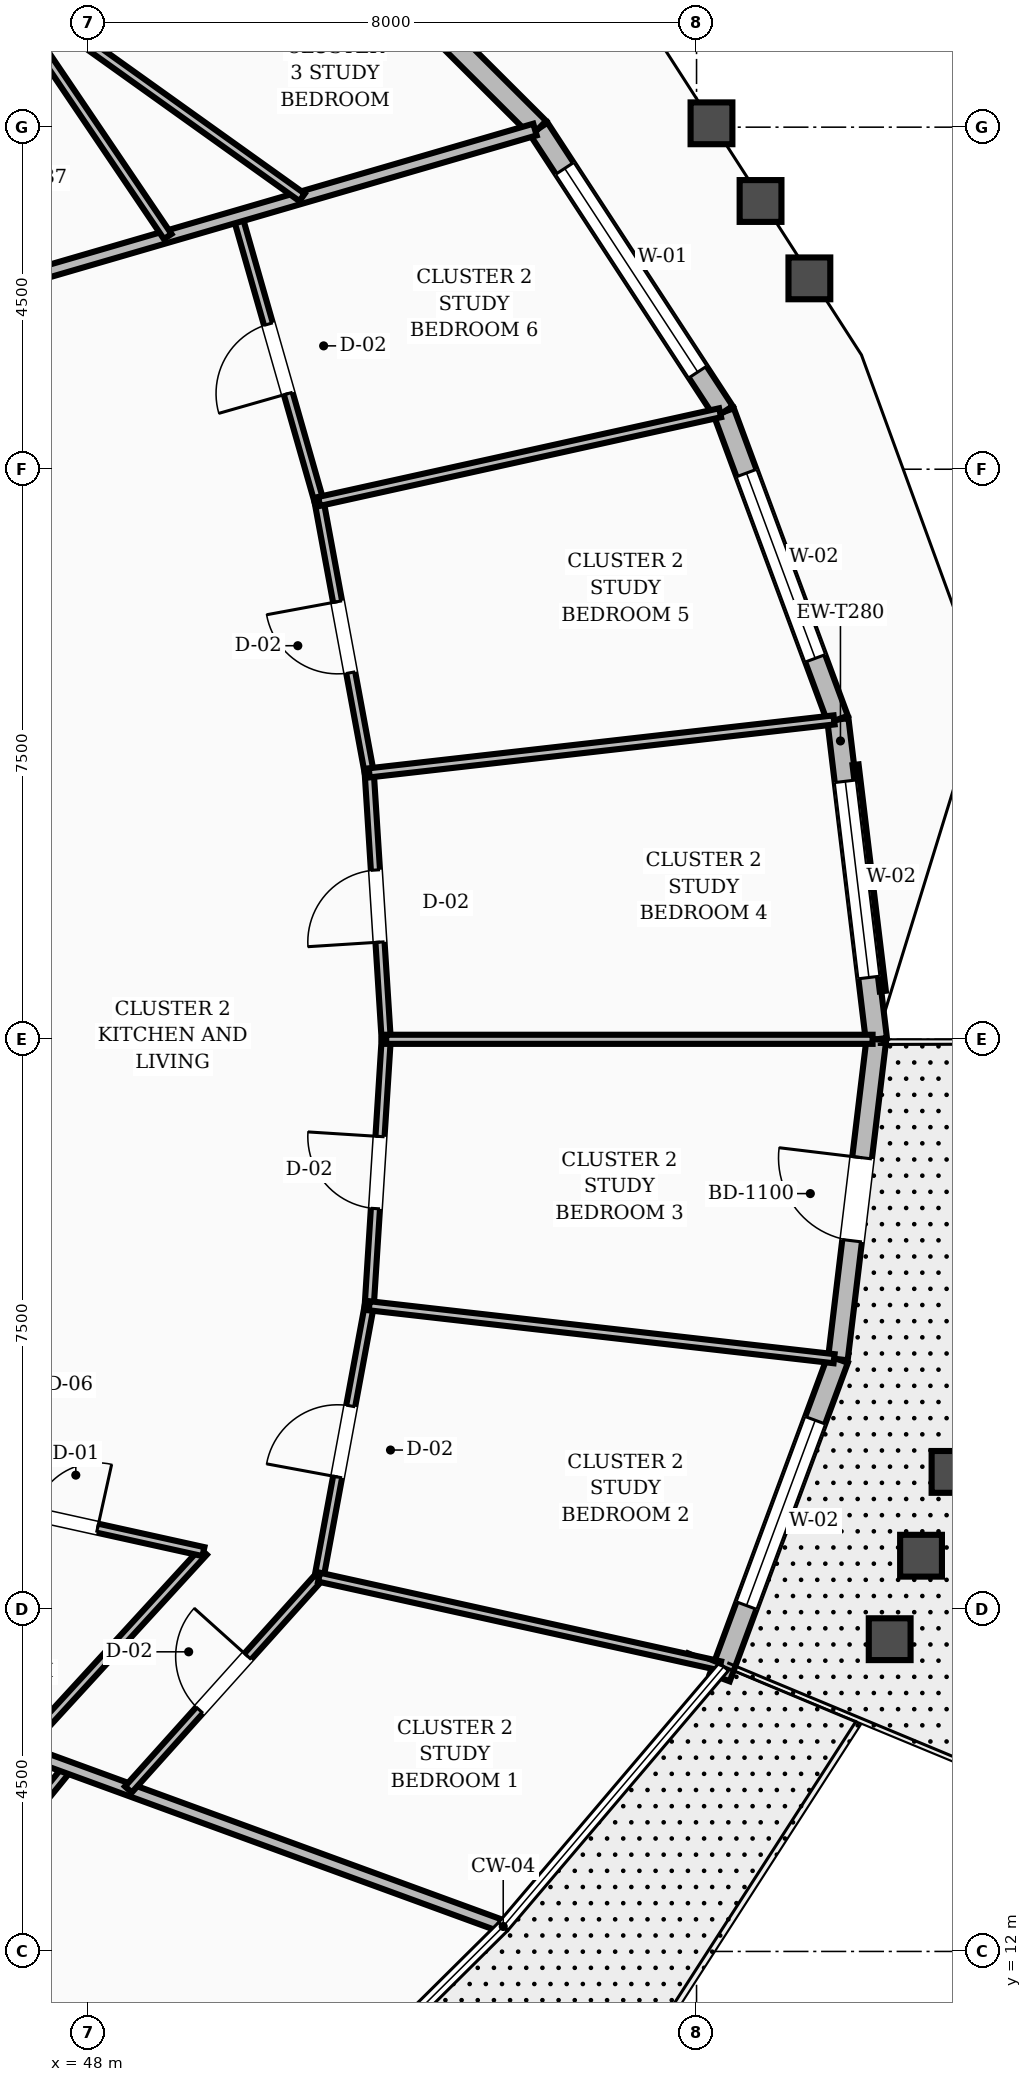
"""IFC4 building model, lengths in metres.
Left out: names, types, materials, properties, quantities, classifications, styles, units other than length and angle.
Written with IfcOpenShell. Run it as: python <this file> out.ifc"""

import sys

from ifc_helpers import new_model, si_unit, direction, frame, frame_2d, origin, place, context, subcontext, project, spatial, rectangle, extrude, element, fill, save


model = new_model("IFC4")
c1 = context("Model", 3, precision=1e-05, world=origin(), true_north=direction((0.0, 1.0)))
c2 = subcontext(c1, "Body", "Model", "MODEL_VIEW")
j1 = project(units=[si_unit("LENGTHUNIT", "METRE"), si_unit("PLANEANGLEUNIT", "RADIAN")], contexts=[c1])
p1 = place(None, origin())
s1 = spatial("IfcSite", under=j1, at=p1, CompositionType="ELEMENT")
p2 = place(p1, origin())
s2 = spatial("IfcBuilding", under=s1, at=p2, CompositionType="ELEMENT")
p3 = place(p2, frame((0.0, 0.0, 149.6)))
s3 = spatial("IfcBuildingStorey", under=s2, at=p3, CompositionType="ELEMENT", Elevation=149.6)
p4 = place(p3, frame((58.366, 24.0, 0.0), z_axis=(0.0, 0.0, 1.0), x_axis=(-0.119531368207, 0.992830424602, 0.0)))
e1 = element("IfcWall", 1, at=p4, inside=s3, PredefinedType="STANDARD", context=c2, shape_type="SweptSolid", body=[
    extrude(rectangle(XDim=4.238, YDim=0.28, at=frame_2d((2.119, 0.0))), origin(), (0.0, 0.0, 1.0), 2.82),
])
p5 = place(p4, frame((0.819, 0.0, 0.8)))
e2 = element("IfcOpeningElement", 2, at=p5, cuts=e1, PredefinedType="OPENING", context=c2, shape_type="SweptSolid", body=[
    extrude(rectangle(XDim=2.6, YDim=1.65, at=frame_2d((1.3, 0.825))), frame((0.0, 0.15, 0.0), z_axis=(0.0, -1.0, 0.0), x_axis=(1.0, 0.0, 0.0)), (0.0, 0.0, 1.0), 0.3),
])
p6 = place(p3, frame((57.859, 28.208, 0.0), z_axis=(0.0, 0.0, 1.0), x_axis=(-0.347673660549, 0.937615606611, 0.0)))
e3 = element("IfcWall", 3, at=p6, inside=s3, PredefinedType="STANDARD", context=c2, shape_type="SweptSolid", body=[
    extrude(rectangle(XDim=4.315, YDim=0.28, at=frame_2d((2.158, 0.0))), origin(), (0.0, 0.0, 1.0), 2.82),
])
p7 = place(p6, frame((0.858, 0.0, 0.8)))
e4 = element("IfcOpeningElement", 4, at=p7, cuts=e3, PredefinedType="OPENING", context=c2, shape_type="SweptSolid", body=[
    extrude(rectangle(XDim=2.6, YDim=1.65, at=frame_2d((1.3, 0.825))), frame((0.0, 0.15, 0.0), z_axis=(0.0, -1.0, 0.0), x_axis=(1.0, 0.0, 0.0)), (0.0, 0.0, 1.0), 0.3),
])
p8 = place(p3, frame((56.359, 32.254, 0.0), z_axis=(0.0, 0.0, 1.0), x_axis=(-0.547011581396, 0.837125038342, 0.0)))
e5 = element("IfcWall", 5, at=p8, inside=s3, PredefinedType="STANDARD", context=c2, shape_type="SweptSolid", body=[
    extrude(rectangle(XDim=4.454, YDim=0.28, at=frame_2d((2.227, 0.0))), origin(), (0.0, 0.0, 1.0), 2.82),
])
p9 = place(p8, frame((0.627, 0.0, 0.8)))
e6 = element("IfcOpeningElement", 6, at=p9, cuts=e5, PredefinedType="OPENING", context=c2, shape_type="SweptSolid", body=[
    extrude(rectangle(XDim=3.2, YDim=1.65, at=frame_2d((1.6, 0.825))), frame((0.0, 0.15, 0.0), z_axis=(0.0, -1.0, 0.0), x_axis=(1.0, 0.0, 0.0)), (0.0, 0.0, 1.0), 0.3),
])
p10 = place(p3, frame((53.922, 35.982, 0.0), z_axis=(0.0, 0.0, 1.0), x_axis=(-0.708239604084, 0.705972140532, 0.0)))
e7 = element("IfcWall", 7, at=p10, inside=s3, PredefinedType="STANDARD", context=c2, shape_type="SweptSolid", body=[
    extrude(rectangle(XDim=4.63, YDim=0.28, at=frame_2d((2.315, 0.0))), origin(), (0.0, 0.0, 1.0), 2.82),
])
p11 = place(p3, frame((56.305, 15.602, 0.0), z_axis=(0.0, 0.0, 1.0), x_axis=(0.347666626945, 0.937618214685, 0.0)))
e8 = element("IfcWall", 8, at=p11, inside=s3, PredefinedType="STANDARD", context=c2, shape_type="SweptSolid", body=[
    extrude(rectangle(XDim=4.469, YDim=0.28, at=frame_2d((2.234, 0.0))), origin(), (0.0, 0.0, 1.0), 2.82),
])
p12 = place(p11, frame((1.011, 0.0, 0.8)))
e9 = element("IfcOpeningElement", 9, at=p12, cuts=e8, PredefinedType="OPENING", context=c2, shape_type="SweptSolid", body=[
    extrude(rectangle(XDim=2.6, YDim=1.65, at=frame_2d((1.3, 0.825))), frame((0.0, 0.15, 0.0), z_axis=(0.0, -1.0, 0.0), x_axis=(1.0, 0.0, 0.0)), (0.0, 0.0, 1.0), 0.3),
])
p13 = place(p3, frame((57.859, 19.792, 0.0), z_axis=(0.0, 0.0, 1.0), x_axis=(0.119531368207, 0.992830424602, 0.0)))
e10 = element("IfcWall", 10, at=p13, inside=s3, PredefinedType="STANDARD", context=c2, shape_type="SweptSolid", body=[
    extrude(rectangle(XDim=4.238, YDim=0.26, at=frame_2d((2.119, 0.0))), origin(), (0.0, 0.0, 1.0), 2.82),
])
p14 = place(p13, frame((1.569, 0.0, 0.0)))
e11 = element("IfcOpeningElement", 11, at=p14, cuts=e10, PredefinedType="OPENING", context=c2, shape_type="SweptSolid", body=[
    extrude(rectangle(XDim=1.1, YDim=2.15, at=frame_2d((0.55, 1.075))), frame((0.0, 0.14, 0.0), z_axis=(0.0, -1.0, 0.0), x_axis=(1.0, 0.0, 0.0)), (0.0, 0.0, 1.0), 0.28),
])
p15 = place(p3, frame((45.504, 11.683, 0.0), z_axis=(0.0, 0.0, 1.0), x_axis=(0.631277203428, 0.775557278628, 0.0)))
e12 = element("IfcWall", 12, at=p15, inside=s3, PredefinedType="PARTITIONING", context=c2, shape_type="SweptSolid", body=[
    extrude(rectangle(XDim=3.53, YDim=0.12, at=frame_2d((1.765, 0.0))), origin(), (0.0, 0.0, 1.0), 2.8),
])
p16 = place(p3, frame((44.65, 15.548, 0.0), z_axis=(0.0, 0.0, 1.0), x_axis=(0.939222726392, -0.343308418524, 0.0)))
e13 = element("IfcWall", 13, at=p16, inside=s3, PredefinedType="SOLIDWALL", context=c2, shape_type="SweptSolid", body=[
    extrude(rectangle(XDim=9.327, YDim=0.16, at=frame_2d((4.663, 0.0))), origin(), (0.0, 0.0, 1.0), 2.8),
])
p17 = place(p3, frame((47.116, 14.646, 0.0), z_axis=(0.0, 0.0, 1.0), x_axis=(0.675771389029, 0.737111273669, 0.0)))
e14 = element("IfcWall", 14, at=p17, inside=s3, PredefinedType="PARTITIONING", context=c2, shape_type="SweptSolid", body=[
    extrude(rectangle(XDim=3.546, YDim=0.12, at=frame_2d((1.773, 0.0))), origin(), (0.0, 0.0, 1.0), 2.8),
])
p18 = place(p3, frame((46.85, 17.849, 0.0), z_axis=(0.0, 0.0, 1.0), x_axis=(0.976420347176, -0.215877987808, 0.0)))
e15 = element("IfcWall", 15, at=p18, inside=s3, PredefinedType="PARTITIONING", context=c2, shape_type="SweptSolid", body=[
    extrude(rectangle(XDim=2.727, YDim=0.12, at=frame_2d((1.363, 0.0))), origin(), (0.0, 0.0, 1.0), 2.8),
])
p19 = place(p18, frame((0.44, 0.0, 0.0)))
e16 = element("IfcOpeningElement", 16, at=p19, cuts=e15, PredefinedType="OPENING", context=c2, shape_type="SweptSolid", body=[
    extrude(rectangle(XDim=0.86, YDim=2.1, at=frame_2d((0.43, 1.05))), frame((0.0, 0.07, 0.0), z_axis=(0.0, -1.0, 0.0), x_axis=(1.0, 0.0, 0.0)), (0.0, 0.0, 1.0), 0.14),
])
p20 = place(p3, frame((48.525, 14.131, 0.0), z_axis=(0.0, 0.0, 1.0), x_axis=(0.668314174757, 0.743879132533, 0.0)))
e17 = element("IfcWall", 17, at=p20, inside=s3, PredefinedType="PARTITIONING", context=c2, shape_type="SweptSolid", body=[
    extrude(rectangle(XDim=3.754, YDim=0.12, at=frame_2d((1.877, 0.0))), origin(), (0.0, 0.0, 1.0), 2.8),
])
p21 = place(p20, frame((1.402, 0.0, 0.0)))
e18 = element("IfcOpeningElement", 18, at=p21, cuts=e17, PredefinedType="OPENING", context=c2, shape_type="SweptSolid", body=[
    extrude(rectangle(XDim=0.95, YDim=2.1, at=frame_2d((0.475, 1.05))), frame((0.0, 0.07, 0.0), z_axis=(0.0, -1.0, 0.0), x_axis=(1.0, 0.0, 0.0)), (0.0, 0.0, 1.0), 0.14),
])
p22 = place(p3, frame((51.034, 16.924, 0.0), z_axis=(0.0, 0.0, 1.0), x_axis=(0.181807554869, 0.9833341309, 0.0)))
e19 = element("IfcWall", 19, at=p22, inside=s3, PredefinedType="PARTITIONING", context=c2, shape_type="SweptSolid", body=[
    extrude(rectangle(XDim=3.631, YDim=0.12, at=frame_2d((1.815, 0.0))), origin(), (0.0, 0.0, 1.0), 2.8),
])
p23 = place(p22, frame((1.341, 0.0, 0.0)))
e20 = element("IfcOpeningElement", 20, at=p23, cuts=e19, PredefinedType="OPENING", context=c2, shape_type="SweptSolid", body=[
    extrude(rectangle(XDim=0.95, YDim=2.1, at=frame_2d((0.475, 1.05))), frame((0.0, 0.07, 0.0), z_axis=(0.0, -1.0, 0.0), x_axis=(1.0, 0.0, 0.0)), (0.0, 0.0, 1.0), 0.14),
])
p24 = place(p3, frame((51.034, 16.924, 0.0), z_axis=(0.0, 0.0, 1.0), x_axis=(0.976410849666, -0.21592094075, 0.0)))
e21 = element("IfcWall", 21, at=p24, inside=s3, PredefinedType="PARTITIONING", context=c2, shape_type="SweptSolid", body=[
    extrude(rectangle(XDim=5.404, YDim=0.12, at=frame_2d((2.702, 0.0))), origin(), (0.0, 0.0, 1.0), 2.8),
])
p25 = place(p3, frame((51.694, 20.494, 0.0), z_axis=(0.0, 0.0, 1.0), x_axis=(0.063455671899, 0.99798465805, 0.0)))
e22 = element("IfcWall", 22, at=p25, inside=s3, PredefinedType="PARTITIONING", context=c2, shape_type="SweptSolid", body=[
    extrude(rectangle(XDim=3.513, YDim=0.12, at=frame_2d((1.756, 0.0))), origin(), (0.0, 0.0, 1.0), 2.8),
])
p26 = place(p25, frame((1.281, 0.0, 0.0)))
e23 = element("IfcOpeningElement", 23, at=p26, cuts=e22, PredefinedType="OPENING", context=c2, shape_type="SweptSolid", body=[
    extrude(rectangle(XDim=0.95, YDim=2.1, at=frame_2d((0.475, 1.05))), frame((0.0, 0.07, 0.0), z_axis=(0.0, -1.0, 0.0), x_axis=(1.0, 0.0, 0.0)), (0.0, 0.0, 1.0), 0.14),
])
p27 = place(p3, frame((51.694, 20.494, 0.0), z_axis=(0.0, 0.0, 1.0), x_axis=(0.993580655241, -0.113125954279, 0.0)))
e24 = element("IfcWall", 24, at=p27, inside=s3, PredefinedType="PARTITIONING", context=c2, shape_type="SweptSolid", body=[
    extrude(rectangle(XDim=6.155, YDim=0.12, at=frame_2d((3.078, 0.0))), origin(), (0.0, 0.0, 1.0), 2.8),
])
p28 = place(p3, frame((51.917, 24.0, 0.0), z_axis=(0.0, 0.0, 1.0), x_axis=(-0.063455671899, 0.99798465805, 0.0)))
e25 = element("IfcWall", 25, at=p28, inside=s3, PredefinedType="PARTITIONING", context=c2, shape_type="SweptSolid", body=[
    extrude(rectangle(XDim=3.513, YDim=0.12, at=frame_2d((1.756, 0.0))), origin(), (0.0, 0.0, 1.0), 2.8),
])
p29 = place(p28, frame((1.281, 0.0, 0.0)))
e26 = element("IfcOpeningElement", 26, at=p29, cuts=e25, PredefinedType="OPENING", context=c2, shape_type="SweptSolid", body=[
    extrude(rectangle(XDim=0.95, YDim=2.1, at=frame_2d((0.475, 1.05))), frame((0.0, 0.07, 0.0), z_axis=(0.0, -1.0, 0.0), x_axis=(1.0, 0.0, 0.0)), (0.0, 0.0, 1.0), 0.14),
])
p30 = place(p3, frame((51.917, 24.0, 0.0), z_axis=(0.0, 0.0, 1.0), x_axis=(1.0, 0.0, 0.0)))
e27 = element("IfcWall", 27, at=p30, inside=s3, PredefinedType="PARTITIONING", context=c2, shape_type="SweptSolid", body=[
    extrude(rectangle(XDim=6.399, YDim=0.12, at=frame_2d((3.199, 0.0))), origin(), (0.0, 0.0, 1.0), 2.8),
])
p31 = place(p3, frame((51.694, 27.506, 0.0), z_axis=(0.0, 0.0, 1.0), x_axis=(-0.181807554869, 0.9833341309, 0.0)))
e28 = element("IfcWall", 28, at=p31, inside=s3, PredefinedType="PARTITIONING", context=c2, shape_type="SweptSolid", body=[
    extrude(rectangle(XDim=3.631, YDim=0.12, at=frame_2d((1.815, 0.0))), origin(), (0.0, 0.0, 1.0), 2.8),
])
p32 = place(p31, frame((1.341, 0.0, 0.0)))
e29 = element("IfcOpeningElement", 29, at=p32, cuts=e28, PredefinedType="OPENING", context=c2, shape_type="SweptSolid", body=[
    extrude(rectangle(XDim=0.95, YDim=2.1, at=frame_2d((0.475, 1.05))), frame((0.0, 0.07, 0.0), z_axis=(0.0, -1.0, 0.0), x_axis=(1.0, 0.0, 0.0)), (0.0, 0.0, 1.0), 0.14),
])
p33 = place(p3, frame((51.694, 27.506, 0.0), z_axis=(0.0, 0.0, 1.0), x_axis=(0.993580655241, 0.113125954279, 0.0)))
e30 = element("IfcWall", 30, at=p33, inside=s3, PredefinedType="PARTITIONING", context=c2, shape_type="SweptSolid", body=[
    extrude(rectangle(XDim=6.155, YDim=0.12, at=frame_2d((3.078, 0.0))), origin(), (0.0, 0.0, 1.0), 2.8),
])
p34 = place(p3, frame((51.034, 31.076, 0.0), z_axis=(0.0, 0.0, 1.0), x_axis=(-0.274679817616, 0.961535749619, 0.0)))
e31 = element("IfcWall", 31, at=p34, inside=s3, PredefinedType="PARTITIONING", context=c2, shape_type="SweptSolid", body=[
    extrude(rectangle(XDim=3.903, YDim=0.12, at=frame_2d((1.951, 0.0))), origin(), (0.0, 0.0, 1.0), 2.8),
])
p35 = place(p34, frame((1.476, 0.0, 0.0)))
e32 = element("IfcOpeningElement", 32, at=p35, cuts=e31, PredefinedType="OPENING", context=c2, shape_type="SweptSolid", body=[
    extrude(rectangle(XDim=0.95, YDim=2.1, at=frame_2d((0.475, 1.05))), frame((0.0, 0.07, 0.0), z_axis=(0.0, -1.0, 0.0), x_axis=(1.0, 0.0, 0.0)), (0.0, 0.0, 1.0), 0.14),
])
p36 = place(p3, frame((51.034, 31.076, 0.0), z_axis=(0.0, 0.0, 1.0), x_axis=(0.976410849666, 0.21592094075, 0.0)))
e33 = element("IfcWall", 33, at=p36, inside=s3, PredefinedType="PARTITIONING", context=c2, shape_type="SweptSolid", body=[
    extrude(rectangle(XDim=5.404, YDim=0.12, at=frame_2d((2.702, 0.0))), origin(), (0.0, 0.0, 1.0), 2.8),
])
p37 = place(p3, frame((46.85, 33.923, 0.0), z_axis=(0.0, 0.0, 1.0), x_axis=(0.960106072599, 0.279636065911, 0.0)))
e34 = element("IfcWall", 34, at=p37, inside=s3, PredefinedType="SOLIDWALL", context=c2, shape_type="SweptSolid", body=[
    extrude(rectangle(XDim=7.316, YDim=0.16, at=frame_2d((3.658, 0.0))), origin(), (0.0, 0.0, 1.0), 2.8),
])
p38 = place(p3, frame((49.042, 34.561, 0.0), z_axis=(0.0, 0.0, 1.0), x_axis=(-0.559875946145, 0.82857644483, 0.0)))
e35 = element("IfcWall", 35, at=p38, inside=s3, PredefinedType="PARTITIONING", context=c2, shape_type="SweptSolid", body=[
    extrude(rectangle(XDim=3.911, YDim=0.12, at=frame_2d((1.955, 0.0))), origin(), (0.0, 0.0, 1.0), 2.8),
])
p39 = place(p3, frame((50.811, 35.076, 0.0), z_axis=(0.0, 0.0, 1.0), x_axis=(-0.813619479842, 0.581397748553, 0.0)))
e36 = element("IfcWall", 36, at=p39, inside=s3, PredefinedType="PARTITIONING", context=c2, shape_type="SweptSolid", body=[
    extrude(rectangle(XDim=8.25, YDim=0.12, at=frame_2d((4.125, 0.0))), origin(), (0.0, 0.0, 1.0), 2.8),
])
p40 = place(p39, frame((5.062, 0.0, 0.0)))
e37 = element("IfcOpeningElement", 37, at=p40, cuts=e36, PredefinedType="OPENING", context=c2, shape_type="SweptSolid", body=[
    extrude(rectangle(XDim=0.95, YDim=2.1, at=frame_2d((0.475, 1.05))), frame((0.0, 0.07, 0.0), z_axis=(0.0, -1.0, 0.0), x_axis=(1.0, 0.0, 0.0)), (0.0, 0.0, 1.0), 0.14),
])
p41 = place(p5, origin())
e38 = element("IfcWindow", 38, at=p41, inside=s3, PartitioningType="SINGLE_PANEL", PredefinedType="WINDOW", context=c2, shape_type="SweptSolid", body=[
    extrude(rectangle(XDim=2.6, YDim=1.65, at=frame_2d((1.3, 0.825))), frame((0.0, 0.03, 0.0), z_axis=(0.0, -1.0, 0.0), x_axis=(1.0, 0.0, 0.0)), (0.0, 0.0, 1.0), 0.06),
])
fill(e2, e38)
p42 = place(p7, origin())
e39 = element("IfcWindow", 39, at=p42, inside=s3, PartitioningType="SINGLE_PANEL", PredefinedType="WINDOW", context=c2, shape_type="SweptSolid", body=[
    extrude(rectangle(XDim=2.6, YDim=1.65, at=frame_2d((1.3, 0.825))), frame((0.0, 0.03, 0.0), z_axis=(0.0, -1.0, 0.0), x_axis=(1.0, 0.0, 0.0)), (0.0, 0.0, 1.0), 0.06),
])
fill(e4, e39)
p43 = place(p9, origin())
e40 = element("IfcWindow", 40, at=p43, inside=s3, PartitioningType="SINGLE_PANEL", PredefinedType="WINDOW", context=c2, shape_type="SweptSolid", body=[
    extrude(rectangle(XDim=3.2, YDim=1.65, at=frame_2d((1.6, 0.825))), frame((0.0, 0.03, 0.0), z_axis=(0.0, -1.0, 0.0), x_axis=(1.0, 0.0, 0.0)), (0.0, 0.0, 1.0), 0.06),
])
fill(e6, e40)
p44 = place(p12, origin())
e41 = element("IfcWindow", 41, at=p44, inside=s3, PartitioningType="SINGLE_PANEL", PredefinedType="WINDOW", context=c2, shape_type="SweptSolid", body=[
    extrude(rectangle(XDim=2.6, YDim=1.65, at=frame_2d((1.3, 0.825))), frame((0.0, 0.03, 0.0), z_axis=(0.0, -1.0, 0.0), x_axis=(1.0, 0.0, 0.0)), (0.0, 0.0, 1.0), 0.06),
])
fill(e9, e41)
p45 = place(p14, origin())
e42 = element("IfcDoor", 42, at=p45, inside=s3, OperationType="SINGLE_SWING_RIGHT", PredefinedType="DOOR", context=c2, shape_type="SweptSolid", body=[
    extrude(rectangle(XDim=1.1, YDim=2.15, at=frame_2d((0.55, 1.075))), frame((0.0, 0.025, 0.0), z_axis=(0.0, -1.0, 0.0), x_axis=(1.0, 0.0, 0.0)), (0.0, 0.0, 1.0), 0.05),
])
fill(e11, e42)
p46 = place(p19, origin())
e43 = element("IfcDoor", 43, at=p46, inside=s3, OperationType="SINGLE_SWING_RIGHT", PredefinedType="DOOR", context=c2, shape_type="SweptSolid", body=[
    extrude(rectangle(XDim=0.86, YDim=2.1, at=frame_2d((0.43, 1.05))), frame((0.0, 0.025, 0.0), z_axis=(0.0, -1.0, 0.0), x_axis=(1.0, 0.0, 0.0)), (0.0, 0.0, 1.0), 0.05),
])
fill(e16, e43)
p47 = place(p21, origin())
e44 = element("IfcDoor", 44, at=p47, inside=s3, OperationType="SINGLE_SWING_RIGHT", PredefinedType="DOOR", context=c2, shape_type="SweptSolid", body=[
    extrude(rectangle(XDim=0.95, YDim=2.1, at=frame_2d((0.475, 1.05))), frame((0.0, 0.025, 0.0), z_axis=(0.0, -1.0, 0.0), x_axis=(1.0, 0.0, 0.0)), (0.0, 0.0, 1.0), 0.05),
])
fill(e18, e44)
p48 = place(p23, origin())
e45 = element("IfcDoor", 45, at=p48, inside=s3, OperationType="SINGLE_SWING_LEFT", PredefinedType="DOOR", context=c2, shape_type="SweptSolid", body=[
    extrude(rectangle(XDim=0.95, YDim=2.1, at=frame_2d((0.475, 1.05))), frame((0.0, 0.025, 0.0), z_axis=(0.0, -1.0, 0.0), x_axis=(1.0, 0.0, 0.0)), (0.0, 0.0, 1.0), 0.05),
])
fill(e20, e45)
p49 = place(p26, origin())
e46 = element("IfcDoor", 46, at=p49, inside=s3, OperationType="SINGLE_SWING_RIGHT", PredefinedType="DOOR", context=c2, shape_type="SweptSolid", body=[
    extrude(rectangle(XDim=0.95, YDim=2.1, at=frame_2d((0.475, 1.05))), frame((0.0, 0.025, 0.0), z_axis=(0.0, -1.0, 0.0), x_axis=(1.0, 0.0, 0.0)), (0.0, 0.0, 1.0), 0.05),
])
fill(e23, e46)
p50 = place(p29, origin())
e47 = element("IfcDoor", 47, at=p50, inside=s3, OperationType="SINGLE_SWING_LEFT", PredefinedType="DOOR", context=c2, shape_type="SweptSolid", body=[
    extrude(rectangle(XDim=0.95, YDim=2.1, at=frame_2d((0.475, 1.05))), frame((0.0, 0.025, 0.0), z_axis=(0.0, -1.0, 0.0), x_axis=(1.0, 0.0, 0.0)), (0.0, 0.0, 1.0), 0.05),
])
fill(e26, e47)
p51 = place(p32, origin())
e48 = element("IfcDoor", 48, at=p51, inside=s3, OperationType="SINGLE_SWING_RIGHT", PredefinedType="DOOR", context=c2, shape_type="SweptSolid", body=[
    extrude(rectangle(XDim=0.95, YDim=2.1, at=frame_2d((0.475, 1.05))), frame((0.0, 0.025, 0.0), z_axis=(0.0, -1.0, 0.0), x_axis=(1.0, 0.0, 0.0)), (0.0, 0.0, 1.0), 0.05),
])
fill(e29, e48)
p52 = place(p35, origin())
e49 = element("IfcDoor", 49, at=p52, inside=s3, OperationType="SINGLE_SWING_LEFT", PredefinedType="DOOR", context=c2, shape_type="SweptSolid", body=[
    extrude(rectangle(XDim=0.95, YDim=2.1, at=frame_2d((0.475, 1.05))), frame((0.0, 0.025, 0.0), z_axis=(0.0, -1.0, 0.0), x_axis=(1.0, 0.0, 0.0)), (0.0, 0.0, 1.0), 0.05),
])
fill(e32, e49)
save(model, sys.argv[1])
